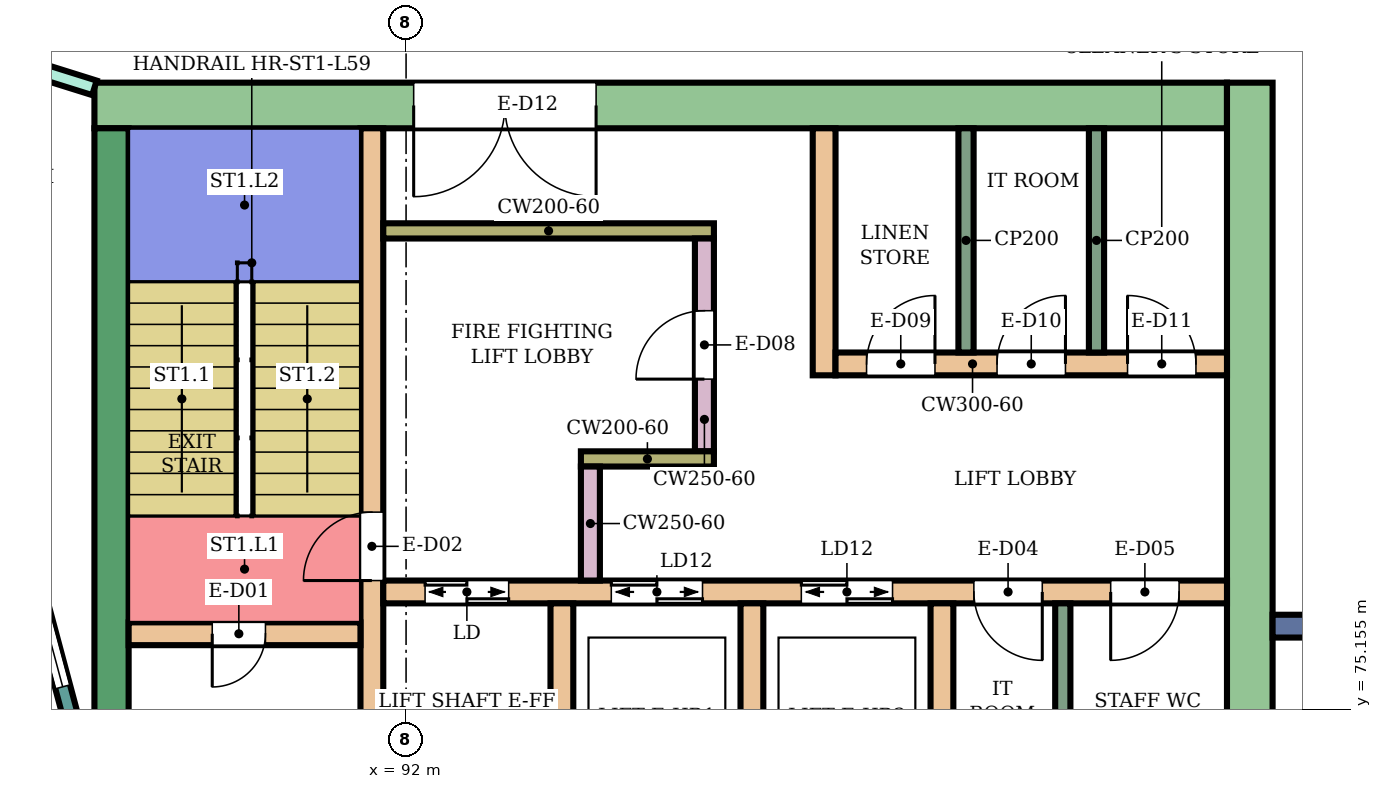
"""IFC4 building model, lengths in metres.
Left out: names, types, materials, properties, quantities, classifications, styles, units other than length and angle.
Written with IfcOpenShell. Run it as: python <this file> out.ifc"""

import sys

from ifc_helpers import new_model, si_unit, direction, frame, frame_2d, origin, place, context, subcontext, project, spatial, rectangle, extrude, element, fill, save


model = new_model("IFC4")
c1 = context("Model", 3, precision=1e-05, world=origin(), true_north=direction((0.0, 1.0)))
c2 = subcontext(c1, "Body", "Model", "MODEL_VIEW")
j1 = project(units=[si_unit("LENGTHUNIT", "METRE"), si_unit("PLANEANGLEUNIT", "RADIAN")], contexts=[c1])
p1 = place(None, origin())
s1 = spatial("IfcSite", under=j1, at=p1, CompositionType="ELEMENT")
p2 = place(p1, origin())
s2 = spatial("IfcBuilding", under=s1, at=p2, CompositionType="ELEMENT")
p3 = place(p2, frame((0.0, 0.0, 258.3)))
s3 = spatial("IfcBuildingStorey", under=s2, at=p3, CompositionType="ELEMENT", Elevation=258.3)
p4 = place(p3, frame((87.9, 83.1, 0.0), z_axis=(0.0, 0.0, 1.0), x_axis=(1.0, 0.0, 0.0)))
e1 = element("IfcWall", 1, at=p4, inside=s3, PredefinedType="SHEAR", context=c2, shape_type="SweptSolid", body=[
    extrude(rectangle(XDim=14.9, YDim=0.6, at=frame_2d((7.45, 0.0))), origin(), (0.0, 0.0, 1.0), 3.88),
])
p5 = place(p4, frame((4.2, 0.0, 0.0)))
e2 = element("IfcOpeningElement", 2, at=p5, cuts=e1, PredefinedType="OPENING", context=c2, shape_type="SweptSolid", body=[
    extrude(rectangle(XDim=2.4, YDim=2.4, at=frame_2d((1.2, 1.2))), frame((0.0, 0.31, 0.0), z_axis=(0.0, -1.0, 0.0), x_axis=(1.0, 0.0, 0.0)), (0.0, 0.0, 1.0), 0.62),
])
p6 = place(p3, frame((88.125, 75.0, 0.0), z_axis=(0.0, 0.0, 1.0), x_axis=(0.0, 1.0, 0.0)))
e3 = element("IfcWall", 3, at=p6, inside=s3, PredefinedType="SHEAR", context=c2, shape_type="SweptSolid", body=[
    extrude(rectangle(XDim=7.8, YDim=0.45, at=frame_2d((3.9, 0.0))), origin(), (0.0, 0.0, 1.0), 3.88),
])
p7 = place(p3, frame((103.1, 66.6, 0.0), z_axis=(0.0, 0.0, 1.0), x_axis=(0.0, 1.0, 0.0)))
e4 = element("IfcWall", 4, at=p7, inside=s3, PredefinedType="SHEAR", context=c2, shape_type="SweptSolid", body=[
    extrude(rectangle(XDim=16.8, YDim=0.6, at=frame_2d((8.4, 0.0))), origin(), (0.0, 0.0, 1.0), 3.88),
])
p8 = place(p3, frame((91.55, 75.0, 0.0), z_axis=(0.0, 0.0, 1.0), x_axis=(0.0, 1.0, 0.0)))
e5 = element("IfcWall", 5, at=p8, inside=s3, PredefinedType="SHEAR", context=c2, shape_type="SweptSolid", body=[
    extrude(rectangle(XDim=7.8, YDim=0.3, at=frame_2d((3.9, 0.0))), origin(), (0.0, 0.0, 1.0), 3.88),
])
p9 = place(p8, frame((1.85, 0.0, 0.0)))
e6 = element("IfcOpeningElement", 6, at=p9, cuts=e5, PredefinedType="OPENING", context=c2, shape_type="SweptSolid", body=[
    extrude(rectangle(XDim=0.9, YDim=2.1, at=frame_2d((0.45, 1.05))), frame((0.0, 0.16, 0.0), z_axis=(0.0, -1.0, 0.0), x_axis=(1.0, 0.0, 0.0)), (0.0, 0.0, 1.0), 0.32),
])
p10 = place(p3, frame((88.35, 76.15, 0.0), z_axis=(0.0, 0.0, 1.0), x_axis=(1.0, 0.0, 0.0)))
e7 = element("IfcWall", 7, at=p10, inside=s3, PredefinedType="SHEAR", context=c2, shape_type="SweptSolid", body=[
    extrude(rectangle(XDim=3.05, YDim=0.3, at=frame_2d((1.525, 0.0))), origin(), (0.0, 0.0, 1.0), 3.88),
])
p11 = place(p10, frame((1.1, 0.0, 0.0)))
e8 = element("IfcOpeningElement", 8, at=p11, cuts=e7, PredefinedType="OPENING", context=c2, shape_type="SweptSolid", body=[
    extrude(rectangle(XDim=0.7, YDim=2.0, at=frame_2d((0.35, 1.0))), frame((0.0, 0.16, 0.0), z_axis=(0.0, -1.0, 0.0), x_axis=(1.0, 0.0, 0.0)), (0.0, 0.0, 1.0), 0.32),
])
p12 = place(p3, frame((91.7, 76.7, 0.0), z_axis=(0.0, 0.0, 1.0), x_axis=(1.0, 0.0, 0.0)))
e9 = element("IfcWall", 9, at=p12, inside=s3, PredefinedType="SHEAR", context=c2, shape_type="SweptSolid", body=[
    extrude(rectangle(XDim=11.1, YDim=0.3, at=frame_2d((5.55, 0.0))), origin(), (0.0, 0.0, 1.0), 3.88),
])
p13 = place(p12, frame((0.55, 0.0, 0.0)))
e10 = element("IfcOpeningElement", 10, at=p13, cuts=e9, PredefinedType="OPENING", context=c2, shape_type="SweptSolid", body=[
    extrude(rectangle(XDim=1.1, YDim=2.1, at=frame_2d((0.55, 1.05))), frame((0.0, 0.16, 0.0), z_axis=(0.0, -1.0, 0.0), x_axis=(1.0, 0.0, 0.0)), (0.0, 0.0, 1.0), 0.32),
])
p14 = place(p12, frame((3.0, 0.0, 0.0)))
e11 = element("IfcOpeningElement", 11, at=p14, cuts=e9, PredefinedType="OPENING", context=c2, shape_type="SweptSolid", body=[
    extrude(rectangle(XDim=1.2, YDim=2.1, at=frame_2d((0.6, 1.05))), frame((0.0, 0.16, 0.0), z_axis=(0.0, -1.0, 0.0), x_axis=(1.0, 0.0, 0.0)), (0.0, 0.0, 1.0), 0.32),
])
p15 = place(p12, frame((5.5, 0.0, 0.0)))
e12 = element("IfcOpeningElement", 12, at=p15, cuts=e9, PredefinedType="OPENING", context=c2, shape_type="SweptSolid", body=[
    extrude(rectangle(XDim=1.2, YDim=2.1, at=frame_2d((0.6, 1.05))), frame((0.0, 0.16, 0.0), z_axis=(0.0, -1.0, 0.0), x_axis=(1.0, 0.0, 0.0)), (0.0, 0.0, 1.0), 0.32),
])
p16 = place(p12, frame((7.77, 0.0, 0.0)))
e13 = element("IfcOpeningElement", 13, at=p16, cuts=e9, PredefinedType="OPENING", context=c2, shape_type="SweptSolid", body=[
    extrude(rectangle(XDim=0.9, YDim=2.1, at=frame_2d((0.45, 1.05))), frame((0.0, 0.16, 0.0), z_axis=(0.0, -1.0, 0.0), x_axis=(1.0, 0.0, 0.0)), (0.0, 0.0, 1.0), 0.32),
])
p17 = place(p12, frame((9.57, 0.0, 0.0)))
e14 = element("IfcOpeningElement", 14, at=p17, cuts=e9, PredefinedType="OPENING", context=c2, shape_type="SweptSolid", body=[
    extrude(rectangle(XDim=0.9, YDim=2.1, at=frame_2d((0.45, 1.05))), frame((0.0, 0.16, 0.0), z_axis=(0.0, -1.0, 0.0), x_axis=(1.0, 0.0, 0.0)), (0.0, 0.0, 1.0), 0.32),
])
for number, where, z_axis, x_axis in (
    (15, (94.05, 74.0, 0.0), (0.0, 0.0, 1.0), (0.0, 1.0, 0.0)),
    (16, (96.55, 74.0, 0.0), (0.0, 0.0, 1.0), (0.0, 1.0, 0.0)),
    (17, (99.05, 74.0, 0.0), (0.0, 0.0, 1.0), (0.0, 1.0, 0.0)),
):
    element("IfcWall", number, at=place(p3, frame(where, z_axis=z_axis, x_axis=x_axis)), inside=s3, PredefinedType="SHEAR", context=c2, shape_type="SweptSolid", body=[
        extrude(rectangle(XDim=2.55, YDim=0.3, at=frame_2d((1.275, 0.0))), origin(), (0.0, 0.0, 1.0), 3.88),
    ])
p18 = place(p3, frame((91.7, 81.45, 0.0), z_axis=(0.0, 0.0, 1.0), x_axis=(1.0, 0.0, 0.0)))
e18 = element("IfcWall", 18, at=p18, inside=s3, PredefinedType="SHEAR", context=c2, shape_type="SweptSolid", body=[
    extrude(rectangle(XDim=4.35, YDim=0.2, at=frame_2d((2.175, 0.0))), origin(), (0.0, 0.0, 1.0), 3.88),
])
p19 = place(p3, frame((95.925, 78.55, 0.0), z_axis=(0.0, 0.0, 1.0), x_axis=(0.0, 1.0, 0.0)))
e19 = element("IfcWall", 19, at=p19, inside=s3, PredefinedType="SHEAR", context=c2, shape_type="SweptSolid", body=[
    extrude(rectangle(XDim=2.8, YDim=0.25, at=frame_2d((1.4, 0.0))), origin(), (0.0, 0.0, 1.0), 3.88),
])
p20 = place(p19, frame((0.95, 0.0, 0.0)))
e20 = element("IfcOpeningElement", 20, at=p20, cuts=e19, PredefinedType="OPENING", context=c2, shape_type="SweptSolid", body=[
    extrude(rectangle(XDim=0.9, YDim=2.1, at=frame_2d((0.45, 1.05))), frame((0.0, 0.135, 0.0), z_axis=(0.0, -1.0, 0.0), x_axis=(1.0, 0.0, 0.0)), (0.0, 0.0, 1.0), 0.27),
])
p21 = place(p3, frame((94.3, 78.45, 0.0), z_axis=(0.0, 0.0, 1.0), x_axis=(1.0, 0.0, 0.0)))
e21 = element("IfcWall", 21, at=p21, inside=s3, PredefinedType="SHEAR", context=c2, shape_type="SweptSolid", body=[
    extrude(rectangle(XDim=1.75, YDim=0.2, at=frame_2d((0.875, 0.0))), origin(), (0.0, 0.0, 1.0), 3.88),
])
p22 = place(p3, frame((94.425, 76.85, 0.0), z_axis=(0.0, 0.0, 1.0), x_axis=(0.0, 1.0, 0.0)))
e22 = element("IfcWall", 22, at=p22, inside=s3, PredefinedType="SHEAR", context=c2, shape_type="SweptSolid", body=[
    extrude(rectangle(XDim=1.5, YDim=0.25, at=frame_2d((0.75, 0.0))), origin(), (0.0, 0.0, 1.0), 3.88),
])
p23 = place(p3, frame((97.5, 79.55, 0.0), z_axis=(0.0, 0.0, 1.0), x_axis=(0.0, 1.0, 0.0)))
e23 = element("IfcWall", 23, at=p23, inside=s3, PredefinedType="SHEAR", context=c2, shape_type="SweptSolid", body=[
    extrude(rectangle(XDim=3.25, YDim=0.3, at=frame_2d((1.625, 0.0))), origin(), (0.0, 0.0, 1.0), 3.88),
])
p24 = place(p3, frame((97.65, 79.7, 0.0), z_axis=(0.0, 0.0, 1.0), x_axis=(1.0, 0.0, 0.0)))
e24 = element("IfcWall", 24, at=p24, inside=s3, PredefinedType="SHEAR", context=c2, shape_type="SweptSolid", body=[
    extrude(rectangle(XDim=5.15, YDim=0.3, at=frame_2d((2.575, 0.0))), origin(), (0.0, 0.0, 1.0), 3.88),
])
p25 = place(p24, frame((0.408, 0.0, 0.0)))
e25 = element("IfcOpeningElement", 25, at=p25, cuts=e24, PredefinedType="OPENING", context=c2, shape_type="SweptSolid", body=[
    extrude(rectangle(XDim=0.9, YDim=2.1, at=frame_2d((0.45, 1.05))), frame((0.0, 0.16, 0.0), z_axis=(0.0, -1.0, 0.0), x_axis=(1.0, 0.0, 0.0)), (0.0, 0.0, 1.0), 0.32),
])
p26 = place(p24, frame((2.125, 0.0, 0.0)))
e26 = element("IfcOpeningElement", 26, at=p26, cuts=e24, PredefinedType="OPENING", context=c2, shape_type="SweptSolid", body=[
    extrude(rectangle(XDim=0.9, YDim=2.1, at=frame_2d((0.45, 1.05))), frame((0.0, 0.16, 0.0), z_axis=(0.0, -1.0, 0.0), x_axis=(1.0, 0.0, 0.0)), (0.0, 0.0, 1.0), 0.32),
])
p27 = place(p24, frame((3.842, 0.0, 0.0)))
e27 = element("IfcOpeningElement", 27, at=p27, cuts=e24, PredefinedType="OPENING", context=c2, shape_type="SweptSolid", body=[
    extrude(rectangle(XDim=0.9, YDim=2.1, at=frame_2d((0.45, 1.05))), frame((0.0, 0.16, 0.0), z_axis=(0.0, -1.0, 0.0), x_axis=(1.0, 0.0, 0.0)), (0.0, 0.0, 1.0), 0.32),
])
p28 = place(p3, frame((103.4, 76.25, 0.0), z_axis=(0.0, 0.0, 1.0), x_axis=(1.0, 0.0, 0.0)))
e28 = element("IfcWall", 28, at=p28, inside=s3, PredefinedType="NOTDEFINED", context=c2, shape_type="SweptSolid", body=[
    extrude(rectangle(XDim=2.416, YDim=0.3, at=frame_2d((1.208, 0.0))), origin(), (0.0, 0.0, 1.0), 4.2),
])
p29 = place(p3, frame((87.604, 75.0, 0.0), z_axis=(0.0, 0.0, 1.0), x_axis=(-0.258789828301, 0.965933654434, 0.0)))
e29 = element("IfcWall", 29, at=p29, inside=s3, PredefinedType="NOTDEFINED", context=c2, shape_type="SweptSolid", body=[
    extrude(rectangle(XDim=3.936, YDim=0.2, at=frame_2d((1.968, 0.0))), origin(), (0.0, 0.0, 1.0), 4.2),
])
p30 = place(p29, frame((0.468, 0.0, 0.9)))
e30 = element("IfcOpeningElement", 30, at=p30, cuts=e29, PredefinedType="OPENING", context=c2, shape_type="SweptSolid", body=[
    extrude(rectangle(XDim=3.0, YDim=2.3, at=frame_2d((1.5, 1.15))), frame((0.0, 0.11, 0.0), z_axis=(0.0, -1.0, 0.0), x_axis=(1.0, 0.0, 0.0)), (0.0, 0.0, 1.0), 0.22),
])
p31 = place(p3, frame((85.587, 84.057, 0.0), z_axis=(0.0, 0.0, 1.0), x_axis=(0.954239513179, -0.299043393987, 0.0)))
e31 = element("IfcWall", 31, at=p31, inside=s3, PredefinedType="PARTITIONING", context=c2, shape_type="SweptSolid", body=[
    extrude(rectangle(XDim=2.424, YDim=0.2, at=frame_2d((1.212, 0.0))), origin(), (0.0, 0.0, 1.0), 3.75),
])
p32 = place(p31, frame((0.762, 0.0, 0.0)))
e32 = element("IfcOpeningElement", 32, at=p32, cuts=e31, PredefinedType="OPENING", context=c2, shape_type="SweptSolid", body=[
    extrude(rectangle(XDim=0.9, YDim=2.1, at=frame_2d((0.45, 1.05))), frame((0.0, 0.11, 0.0), z_axis=(0.0, -1.0, 0.0), x_axis=(1.0, 0.0, 0.0)), (0.0, 0.0, 1.0), 0.22),
])
p33 = place(p3, frame((100.64, 74.0, 0.0), z_axis=(0.0, 0.0, 1.0), x_axis=(0.0, 1.0, 0.0)))
e33 = element("IfcWall", 33, at=p33, inside=s3, PredefinedType="PARTITIONING", context=c2, shape_type="SweptSolid", body=[
    extrude(rectangle(XDim=2.55, YDim=0.2, at=frame_2d((1.275, 0.0))), origin(), (0.0, 0.0, 1.0), 3.88),
])
for number, where, z_axis, x_axis in (
    (34, (99.367, 79.85, 0.0), (0.0, 0.0, 1.0), (0.0, 1.0, 0.0)),
    (35, (101.083, 79.85, 0.0), (0.0, 0.0, 1.0), (0.0, 1.0, 0.0)),
):
    element("IfcWall", number, at=place(p3, frame(where, z_axis=z_axis, x_axis=x_axis)), inside=s3, PredefinedType="PARTITIONING", context=c2, shape_type="SweptSolid", body=[
        extrude(rectangle(XDim=2.95, YDim=0.2, at=frame_2d((1.475, 0.0))), origin(), (0.0, 0.0, 1.0), 3.88),
    ])
p34 = place(p30, origin())
e36 = element("IfcWindow", 36, at=p34, inside=s3, PartitioningType="SINGLE_PANEL", PredefinedType="WINDOW", context=c2, shape_type="SweptSolid", body=[
    extrude(rectangle(XDim=3.0, YDim=2.3, at=frame_2d((1.5, 1.15))), frame((0.0, 0.03, 0.0), z_axis=(0.0, -1.0, 0.0), x_axis=(1.0, 0.0, 0.0)), (0.0, 0.0, 1.0), 0.06),
])
fill(e30, e36)
p35 = place(p11, frame((0.7, 0.0, 0.0), z_axis=(0.0, 0.0, 1.0), x_axis=(-1.0, 0.0, 0.0)))
e37 = element("IfcDoor", 37, at=p35, inside=s3, OperationType="SINGLE_SWING_RIGHT", PredefinedType="DOOR", context=c2, shape_type="SweptSolid", body=[
    extrude(rectangle(XDim=0.7, YDim=2.0, at=frame_2d((0.35, 1.0))), frame((0.0, 0.025, 0.0), z_axis=(0.0, -1.0, 0.0), x_axis=(1.0, 0.0, 0.0)), (0.0, 0.0, 1.0), 0.05),
])
fill(e8, e37)
p36 = place(p9, origin())
e38 = element("IfcDoor", 38, at=p36, inside=s3, OperationType="SINGLE_SWING_LEFT", PredefinedType="DOOR", context=c2, shape_type="SweptSolid", body=[
    extrude(rectangle(XDim=0.9, YDim=2.1, at=frame_2d((0.45, 1.05))), frame((0.0, 0.025, 0.0), z_axis=(0.0, -1.0, 0.0), x_axis=(1.0, 0.0, 0.0)), (0.0, 0.0, 1.0), 0.05),
])
fill(e6, e38)
p37 = place(p13, origin())
e39 = element("IfcDoor", 39, at=p37, inside=s3, OperationType="DOUBLE_DOOR_SLIDING", PredefinedType="DOOR", context=c2, shape_type="SweptSolid", body=[
    extrude(rectangle(XDim=1.1, YDim=2.1, at=frame_2d((0.55, 1.05))), frame((0.0, 0.025, 0.0), z_axis=(0.0, -1.0, 0.0), x_axis=(1.0, 0.0, 0.0)), (0.0, 0.0, 1.0), 0.05),
])
fill(e10, e39)
p38 = place(p14, origin())
e40 = element("IfcDoor", 40, at=p38, inside=s3, OperationType="DOUBLE_DOOR_SLIDING", PredefinedType="DOOR", context=c2, shape_type="SweptSolid", body=[
    extrude(rectangle(XDim=1.2, YDim=2.1, at=frame_2d((0.6, 1.05))), frame((0.0, 0.025, 0.0), z_axis=(0.0, -1.0, 0.0), x_axis=(1.0, 0.0, 0.0)), (0.0, 0.0, 1.0), 0.05),
])
fill(e11, e40)
p39 = place(p15, origin())
e41 = element("IfcDoor", 41, at=p39, inside=s3, OperationType="DOUBLE_DOOR_SLIDING", PredefinedType="DOOR", context=c2, shape_type="SweptSolid", body=[
    extrude(rectangle(XDim=1.2, YDim=2.1, at=frame_2d((0.6, 1.05))), frame((0.0, 0.025, 0.0), z_axis=(0.0, -1.0, 0.0), x_axis=(1.0, 0.0, 0.0)), (0.0, 0.0, 1.0), 0.05),
])
fill(e12, e41)
p40 = place(p16, frame((0.9, 0.0, 0.0), z_axis=(0.0, 0.0, 1.0), x_axis=(-1.0, 0.0, 0.0)))
e42 = element("IfcDoor", 42, at=p40, inside=s3, OperationType="SINGLE_SWING_LEFT", PredefinedType="DOOR", context=c2, shape_type="SweptSolid", body=[
    extrude(rectangle(XDim=0.9, YDim=2.1, at=frame_2d((0.45, 1.05))), frame((0.0, 0.025, 0.0), z_axis=(0.0, -1.0, 0.0), x_axis=(1.0, 0.0, 0.0)), (0.0, 0.0, 1.0), 0.05),
])
fill(e13, e42)
p41 = place(p17, frame((0.9, 0.0, 0.0), z_axis=(0.0, 0.0, 1.0), x_axis=(-1.0, 0.0, 0.0)))
e43 = element("IfcDoor", 43, at=p41, inside=s3, OperationType="SINGLE_SWING_RIGHT", PredefinedType="DOOR", context=c2, shape_type="SweptSolid", body=[
    extrude(rectangle(XDim=0.9, YDim=2.1, at=frame_2d((0.45, 1.05))), frame((0.0, 0.025, 0.0), z_axis=(0.0, -1.0, 0.0), x_axis=(1.0, 0.0, 0.0)), (0.0, 0.0, 1.0), 0.05),
])
fill(e14, e43)
p42 = place(p20, origin())
e44 = element("IfcDoor", 44, at=p42, inside=s3, OperationType="SINGLE_SWING_LEFT", PredefinedType="DOOR", context=c2, shape_type="SweptSolid", body=[
    extrude(rectangle(XDim=0.9, YDim=2.1, at=frame_2d((0.45, 1.05))), frame((0.0, 0.025, 0.0), z_axis=(0.0, -1.0, 0.0), x_axis=(1.0, 0.0, 0.0)), (0.0, 0.0, 1.0), 0.05),
])
fill(e20, e44)
p43 = place(p25, origin())
e45 = element("IfcDoor", 45, at=p43, inside=s3, OperationType="SINGLE_SWING_RIGHT", PredefinedType="DOOR", context=c2, shape_type="SweptSolid", body=[
    extrude(rectangle(XDim=0.9, YDim=2.1, at=frame_2d((0.45, 1.05))), frame((0.0, 0.025, 0.0), z_axis=(0.0, -1.0, 0.0), x_axis=(1.0, 0.0, 0.0)), (0.0, 0.0, 1.0), 0.05),
])
fill(e25, e45)
p44 = place(p26, origin())
e46 = element("IfcDoor", 46, at=p44, inside=s3, OperationType="SINGLE_SWING_RIGHT", PredefinedType="DOOR", context=c2, shape_type="SweptSolid", body=[
    extrude(rectangle(XDim=0.9, YDim=2.1, at=frame_2d((0.45, 1.05))), frame((0.0, 0.025, 0.0), z_axis=(0.0, -1.0, 0.0), x_axis=(1.0, 0.0, 0.0)), (0.0, 0.0, 1.0), 0.05),
])
fill(e26, e46)
p45 = place(p27, origin())
e47 = element("IfcDoor", 47, at=p45, inside=s3, OperationType="SINGLE_SWING_LEFT", PredefinedType="DOOR", context=c2, shape_type="SweptSolid", body=[
    extrude(rectangle(XDim=0.9, YDim=2.1, at=frame_2d((0.45, 1.05))), frame((0.0, 0.025, 0.0), z_axis=(0.0, -1.0, 0.0), x_axis=(1.0, 0.0, 0.0)), (0.0, 0.0, 1.0), 0.05),
])
fill(e27, e47)
p46 = place(p5, frame((2.4, 0.0, 0.0), z_axis=(0.0, 0.0, 1.0), x_axis=(-1.0, 0.0, 0.0)))
e48 = element("IfcDoor", 48, at=p46, inside=s3, OperationType="DOUBLE_DOOR_SINGLE_SWING", PredefinedType="DOOR", context=c2, shape_type="SweptSolid", body=[
    extrude(rectangle(XDim=2.4, YDim=2.4, at=frame_2d((1.2, 1.2))), frame((0.0, 0.025, 0.0), z_axis=(0.0, -1.0, 0.0), x_axis=(1.0, 0.0, 0.0)), (0.0, 0.0, 1.0), 0.05),
])
fill(e2, e48)
save(model, sys.argv[1])
